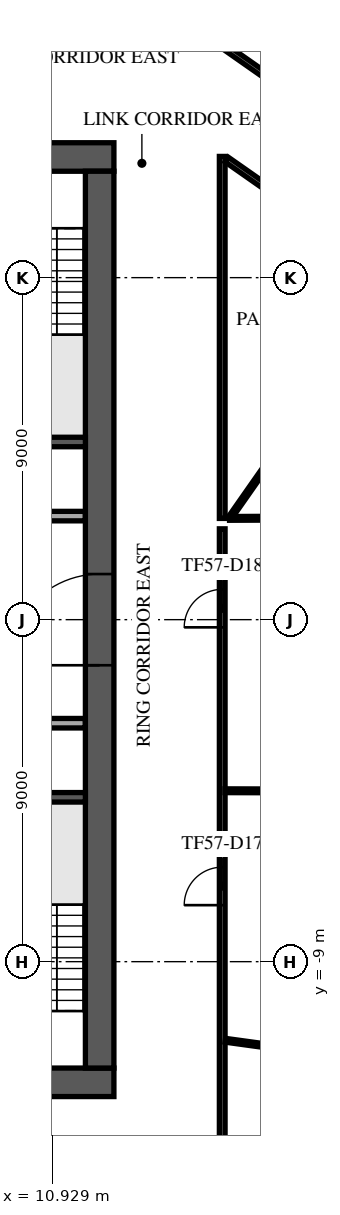
"""IFC4 building model, lengths in metres.
Left out: names, types, materials, properties, quantities, classifications, styles, units other than length and angle.
Written with IfcOpenShell. Run it as: python <this file> out.ifc"""

import sys

from ifc_helpers import new_model, si_unit, direction, frame, frame_2d, origin, place, context, subcontext, project, spatial, rectangle, extrude, element, fill, save


model = new_model("IFC4")
c1 = context("Model", 3, precision=1e-05, world=origin(), true_north=direction((0.0, 1.0)))
c2 = subcontext(c1, "Body", "Model", "MODEL_VIEW")
j1 = project(units=[si_unit("LENGTHUNIT", "METRE"), si_unit("PLANEANGLEUNIT", "RADIAN")], contexts=[c1])
p1 = place(None, origin())
s1 = spatial("IfcSite", under=j1, at=p1, CompositionType="ELEMENT")
p2 = place(p1, origin())
s2 = spatial("IfcBuilding", under=s1, at=p2, CompositionType="ELEMENT")
p3 = place(p2, frame((0.0, 0.0, 246.9)))
s3 = spatial("IfcBuildingStorey", under=s2, at=p3, CompositionType="ELEMENT", Elevation=246.9)
p4 = place(p3, frame((-12.55, 12.175, 0.0), z_axis=(0.0, 0.0, 1.0), x_axis=(1.0, 0.0, 0.0)))
e1 = element("IfcWall", 1, at=p4, inside=s3, PredefinedType="SHEAR", context=c2, shape_type="SweptSolid", body=[
    extrude(rectangle(XDim=25.1, YDim=0.75, at=frame_2d((12.55, 0.0))), origin(), (0.0, 0.0, 1.0), 3.64),
])
p5 = place(p4, frame((11.35, 0.0, 0.0)))
e2 = element("IfcOpeningElement", 2, at=p5, cuts=e1, PredefinedType="OPENING", context=c2, shape_type="SweptSolid", body=[
    extrude(rectangle(XDim=2.4, YDim=2.4, at=frame_2d((1.2, 1.2))), frame((0.0, 0.385, 0.0), z_axis=(0.0, -1.0, 0.0), x_axis=(1.0, 0.0, 0.0)), (0.0, 0.0, 1.0), 0.77),
])
p6 = place(p4, frame((22.175, 0.0, 0.0)))
e3 = element("IfcOpeningElement", 3, at=p6, cuts=e1, PredefinedType="OPENING", context=c2, shape_type="SweptSolid", body=[
    extrude(rectangle(XDim=1.2, YDim=2.1, at=frame_2d((0.6, 1.05))), frame((0.0, 0.385, 0.0), z_axis=(0.0, -1.0, 0.0), x_axis=(1.0, 0.0, 0.0)), (0.0, 0.0, 1.0), 0.77),
])
p7 = place(p4, frame((1.15, 0.0, 0.0)))
e4 = element("IfcOpeningElement", 4, at=p7, cuts=e1, PredefinedType="OPENING", context=c2, shape_type="SweptSolid", body=[
    extrude(rectangle(XDim=1.0, YDim=2.1, at=frame_2d((0.5, 1.05))), frame((0.0, 0.385, 0.0), z_axis=(0.0, -1.0, 0.0), x_axis=(1.0, 0.0, 0.0)), (0.0, 0.0, 1.0), 0.77),
])
p8 = place(p3, frame((-12.55, -12.175, 0.0), z_axis=(0.0, 0.0, 1.0), x_axis=(1.0, 0.0, 0.0)))
e5 = element("IfcWall", 5, at=p8, inside=s3, PredefinedType="SHEAR", context=c2, shape_type="SweptSolid", body=[
    extrude(rectangle(XDim=25.1, YDim=0.75, at=frame_2d((12.55, 0.0))), origin(), (0.0, 0.0, 1.0), 3.64),
])
p9 = place(p8, frame((7.45, 0.0, 0.0)))
e6 = element("IfcOpeningElement", 6, at=p9, cuts=e5, PredefinedType="OPENING", context=c2, shape_type="SweptSolid", body=[
    extrude(rectangle(XDim=2.0, YDim=2.1, at=frame_2d((1.0, 1.05))), frame((0.0, 0.385, 0.0), z_axis=(0.0, -1.0, 0.0), x_axis=(1.0, 0.0, 0.0)), (0.0, 0.0, 1.0), 0.77),
])
p10 = place(p8, frame((17.575, 0.0, 0.0)))
e7 = element("IfcOpeningElement", 7, at=p10, cuts=e5, PredefinedType="OPENING", context=c2, shape_type="SweptSolid", body=[
    extrude(rectangle(XDim=1.2, YDim=2.1, at=frame_2d((0.6, 1.05))), frame((0.0, 0.385, 0.0), z_axis=(0.0, -1.0, 0.0), x_axis=(1.0, 0.0, 0.0)), (0.0, 0.0, 1.0), 0.77),
])
p11 = place(p8, frame((1.725, 0.0, 0.0)))
e8 = element("IfcOpeningElement", 8, at=p11, cuts=e5, PredefinedType="OPENING", context=c2, shape_type="SweptSolid", body=[
    extrude(rectangle(XDim=1.2, YDim=2.1, at=frame_2d((0.6, 1.05))), frame((0.0, 0.385, 0.0), z_axis=(0.0, -1.0, 0.0), x_axis=(1.0, 0.0, 0.0)), (0.0, 0.0, 1.0), 0.77),
])
p12 = place(p8, frame((22.175, 0.0, 0.0)))
e9 = element("IfcOpeningElement", 9, at=p12, cuts=e5, PredefinedType="OPENING", context=c2, shape_type="SweptSolid", body=[
    extrude(rectangle(XDim=1.2, YDim=2.1, at=frame_2d((0.6, 1.05))), frame((0.0, 0.385, 0.0), z_axis=(0.0, -1.0, 0.0), x_axis=(1.0, 0.0, 0.0)), (0.0, 0.0, 1.0), 0.77),
])
p13 = place(p3, frame((12.175, -11.8, 0.0), z_axis=(0.0, 0.0, 1.0), x_axis=(0.0, 1.0, 0.0)))
e10 = element("IfcWall", 10, at=p13, inside=s3, PredefinedType="SHEAR", context=c2, shape_type="SweptSolid", body=[
    extrude(rectangle(XDim=23.6, YDim=0.75, at=frame_2d((11.8, 0.0))), origin(), (0.0, 0.0, 1.0), 3.64),
])
p14 = place(p13, frame((10.6, 0.0, 0.0)))
e11 = element("IfcOpeningElement", 11, at=p14, cuts=e10, PredefinedType="OPENING", context=c2, shape_type="SweptSolid", body=[
    extrude(rectangle(XDim=2.4, YDim=2.4, at=frame_2d((1.2, 1.2))), frame((0.0, 0.385, 0.0), z_axis=(0.0, -1.0, 0.0), x_axis=(1.0, 0.0, 0.0)), (0.0, 0.0, 1.0), 0.77),
])
for number, where, z_axis, x_axis in (
    (12, (8.65, 4.675, 0.0), (0.0, 0.0, 1.0), (1.0, 0.0, 0.0)),
    (13, (8.65, -4.675, 0.0), (0.0, 0.0, 1.0), (1.0, 0.0, 0.0)),
):
    element("IfcWall", number, at=place(p3, frame(where, z_axis=z_axis, x_axis=x_axis)), inside=s3, PredefinedType="SOLIDWALL", context=c2, shape_type="SweptSolid", body=[
        extrude(rectangle(XDim=3.15, YDim=0.25, at=frame_2d((1.575, 0.0))), origin(), (0.0, 0.0, 1.0), 3.64),
    ])
p15 = place(p3, frame((5.63, -2.725, 0.0), z_axis=(0.0, 0.0, 1.0), x_axis=(1.0, 0.0, 0.0)))
e14 = element("IfcWall", 14, at=p15, inside=s3, PredefinedType="PARTITIONING", context=c2, shape_type="SweptSolid", body=[
    extrude(rectangle(XDim=6.165, YDim=0.25, at=frame_2d((3.083, 0.0))), origin(), (0.0, 0.0, 1.0), 3.64),
])
p16 = place(p15, frame((0.745, 0.0, 0.0)))
e15 = element("IfcOpeningElement", 15, at=p16, cuts=e14, PredefinedType="OPENING", context=c2, shape_type="SweptSolid", body=[
    extrude(rectangle(XDim=1.0, YDim=2.1, at=frame_2d((0.5, 1.05))), frame((0.0, 0.135, 0.0), z_axis=(0.0, -1.0, 0.0), x_axis=(1.0, 0.0, 0.0)), (0.0, 0.0, 1.0), 0.27),
])
p17 = place(p15, frame((3.92, 0.0, 0.0)))
e16 = element("IfcOpeningElement", 16, at=p17, cuts=e14, PredefinedType="OPENING", context=c2, shape_type="SweptSolid", body=[
    extrude(rectangle(XDim=0.9, YDim=2.1, at=frame_2d((0.45, 1.05))), frame((0.0, 0.135, 0.0), z_axis=(0.0, -1.0, 0.0), x_axis=(1.0, 0.0, 0.0)), (0.0, 0.0, 1.0), 0.27),
])
p18 = place(p3, frame((-11.795, 2.725, 0.0), z_axis=(0.0, 0.0, 1.0), x_axis=(1.0, 0.0, 0.0)))
e17 = element("IfcWall", 17, at=p18, inside=s3, PredefinedType="PARTITIONING", context=c2, shape_type="SweptSolid", body=[
    extrude(rectangle(XDim=23.59, YDim=0.25, at=frame_2d((11.795, 0.0))), origin(), (0.0, 0.0, 1.0), 3.64),
])
p19 = place(p18, frame((21.345, 0.0, 0.0)))
e18 = element("IfcOpeningElement", 18, at=p19, cuts=e17, PredefinedType="OPENING", context=c2, shape_type="SweptSolid", body=[
    extrude(rectangle(XDim=0.9, YDim=2.1, at=frame_2d((0.45, 1.05))), frame((0.0, 0.135, 0.0), z_axis=(0.0, -1.0, 0.0), x_axis=(1.0, 0.0, 0.0)), (0.0, 0.0, 1.0), 0.27),
])
p20 = place(p18, frame((1.345, 0.0, 0.0)))
e19 = element("IfcOpeningElement", 19, at=p20, cuts=e17, PredefinedType="OPENING", context=c2, shape_type="SweptSolid", body=[
    extrude(rectangle(XDim=0.9, YDim=2.1, at=frame_2d((0.45, 1.05))), frame((0.0, 0.135, 0.0), z_axis=(0.0, -1.0, 0.0), x_axis=(1.0, 0.0, 0.0)), (0.0, 0.0, 1.0), 0.27),
])
p21 = place(p18, frame((4.42, 0.0, 0.0)))
e20 = element("IfcOpeningElement", 20, at=p21, cuts=e17, PredefinedType="OPENING", context=c2, shape_type="SweptSolid", body=[
    extrude(rectangle(XDim=1.0, YDim=2.1, at=frame_2d((0.5, 1.05))), frame((0.0, 0.135, 0.0), z_axis=(0.0, -1.0, 0.0), x_axis=(1.0, 0.0, 0.0)), (0.0, 0.0, 1.0), 0.27),
])
p22 = place(p18, frame((7.17, 0.0, 0.0)))
e21 = element("IfcOpeningElement", 21, at=p22, cuts=e17, PredefinedType="OPENING", context=c2, shape_type="SweptSolid", body=[
    extrude(rectangle(XDim=1.0, YDim=2.1, at=frame_2d((0.5, 1.05))), frame((0.0, 0.135, 0.0), z_axis=(0.0, -1.0, 0.0), x_axis=(1.0, 0.0, 0.0)), (0.0, 0.0, 1.0), 0.27),
])
p23 = place(p18, frame((12.57, 0.0, 0.0)))
e22 = element("IfcOpeningElement", 22, at=p23, cuts=e17, PredefinedType="OPENING", context=c2, shape_type="SweptSolid", body=[
    extrude(rectangle(XDim=1.2, YDim=2.1, at=frame_2d((0.6, 1.05))), frame((0.0, 0.135, 0.0), z_axis=(0.0, -1.0, 0.0), x_axis=(1.0, 0.0, 0.0)), (0.0, 0.0, 1.0), 0.27),
])
p24 = place(p3, frame((5.206, -33.362, 0.0), z_axis=(0.0, 0.0, 1.0), x_axis=(0.573577438409, 0.81915134264, 0.0)))
e23 = element("IfcWall", 23, at=p24, inside=s3, PredefinedType="STANDARD", context=c2, shape_type="SweptSolid", body=[
    extrude(rectangle(XDim=48.686, YDim=0.6, at=frame_2d((24.343, 0.0))), origin(), (0.0, 0.0, 1.0), 3.64),
])
p25 = place(p24, frame((1.213, 0.0, 0.9)))
e24 = element("IfcOpeningElement", 24, at=p25, cuts=e23, PredefinedType="OPENING", context=c2, shape_type="SweptSolid", body=[
    extrude(rectangle(XDim=2.0, YDim=2.1, at=frame_2d((1.0, 1.05))), frame((0.0, 0.31, 0.0), z_axis=(0.0, -1.0, 0.0), x_axis=(1.0, 0.0, 0.0)), (0.0, 0.0, 1.0), 0.62),
])
p26 = place(p24, frame((5.639, 0.0, 0.9)))
e25 = element("IfcOpeningElement", 25, at=p26, cuts=e23, PredefinedType="OPENING", context=c2, shape_type="SweptSolid", body=[
    extrude(rectangle(XDim=2.0, YDim=2.1, at=frame_2d((1.0, 1.05))), frame((0.0, 0.31, 0.0), z_axis=(0.0, -1.0, 0.0), x_axis=(1.0, 0.0, 0.0)), (0.0, 0.0, 1.0), 0.62),
])
p27 = place(p24, frame((10.065, 0.0, 0.9)))
e26 = element("IfcOpeningElement", 26, at=p27, cuts=e23, PredefinedType="OPENING", context=c2, shape_type="SweptSolid", body=[
    extrude(rectangle(XDim=2.0, YDim=2.1, at=frame_2d((1.0, 1.05))), frame((0.0, 0.31, 0.0), z_axis=(0.0, -1.0, 0.0), x_axis=(1.0, 0.0, 0.0)), (0.0, 0.0, 1.0), 0.62),
])
p28 = place(p24, frame((14.491, 0.0, 0.9)))
e27 = element("IfcOpeningElement", 27, at=p28, cuts=e23, PredefinedType="OPENING", context=c2, shape_type="SweptSolid", body=[
    extrude(rectangle(XDim=2.0, YDim=2.1, at=frame_2d((1.0, 1.05))), frame((0.0, 0.31, 0.0), z_axis=(0.0, -1.0, 0.0), x_axis=(1.0, 0.0, 0.0)), (0.0, 0.0, 1.0), 0.62),
])
p29 = place(p24, frame((18.917, 0.0, 0.9)))
e28 = element("IfcOpeningElement", 28, at=p29, cuts=e23, PredefinedType="OPENING", context=c2, shape_type="SweptSolid", body=[
    extrude(rectangle(XDim=2.0, YDim=2.1, at=frame_2d((1.0, 1.05))), frame((0.0, 0.31, 0.0), z_axis=(0.0, -1.0, 0.0), x_axis=(1.0, 0.0, 0.0)), (0.0, 0.0, 1.0), 0.62),
])
p30 = place(p24, frame((23.343, 0.0, 0.9)))
e29 = element("IfcOpeningElement", 29, at=p30, cuts=e23, PredefinedType="OPENING", context=c2, shape_type="SweptSolid", body=[
    extrude(rectangle(XDim=2.0, YDim=2.1, at=frame_2d((1.0, 1.05))), frame((0.0, 0.31, 0.0), z_axis=(0.0, -1.0, 0.0), x_axis=(1.0, 0.0, 0.0)), (0.0, 0.0, 1.0), 0.62),
])
p31 = place(p24, frame((27.769, 0.0, 0.9)))
e30 = element("IfcOpeningElement", 30, at=p31, cuts=e23, PredefinedType="OPENING", context=c2, shape_type="SweptSolid", body=[
    extrude(rectangle(XDim=2.0, YDim=2.1, at=frame_2d((1.0, 1.05))), frame((0.0, 0.31, 0.0), z_axis=(0.0, -1.0, 0.0), x_axis=(1.0, 0.0, 0.0)), (0.0, 0.0, 1.0), 0.62),
])
p32 = place(p24, frame((32.195, 0.0, 0.9)))
e31 = element("IfcOpeningElement", 31, at=p32, cuts=e23, PredefinedType="OPENING", context=c2, shape_type="SweptSolid", body=[
    extrude(rectangle(XDim=2.0, YDim=2.1, at=frame_2d((1.0, 1.05))), frame((0.0, 0.31, 0.0), z_axis=(0.0, -1.0, 0.0), x_axis=(1.0, 0.0, 0.0)), (0.0, 0.0, 1.0), 0.62),
])
p33 = place(p24, frame((36.621, 0.0, 0.9)))
e32 = element("IfcOpeningElement", 32, at=p33, cuts=e23, PredefinedType="OPENING", context=c2, shape_type="SweptSolid", body=[
    extrude(rectangle(XDim=2.0, YDim=2.1, at=frame_2d((1.0, 1.05))), frame((0.0, 0.31, 0.0), z_axis=(0.0, -1.0, 0.0), x_axis=(1.0, 0.0, 0.0)), (0.0, 0.0, 1.0), 0.62),
])
p34 = place(p24, frame((41.047, 0.0, 0.9)))
e33 = element("IfcOpeningElement", 33, at=p34, cuts=e23, PredefinedType="OPENING", context=c2, shape_type="SweptSolid", body=[
    extrude(rectangle(XDim=2.0, YDim=2.1, at=frame_2d((1.0, 1.05))), frame((0.0, 0.31, 0.0), z_axis=(0.0, -1.0, 0.0), x_axis=(1.0, 0.0, 0.0)), (0.0, 0.0, 1.0), 0.62),
])
p35 = place(p24, frame((45.473, 0.0, 0.9)))
e34 = element("IfcOpeningElement", 34, at=p35, cuts=e23, PredefinedType="OPENING", context=c2, shape_type="SweptSolid", body=[
    extrude(rectangle(XDim=2.0, YDim=2.1, at=frame_2d((1.0, 1.05))), frame((0.0, 0.31, 0.0), z_axis=(0.0, -1.0, 0.0), x_axis=(1.0, 0.0, 0.0)), (0.0, 0.0, 1.0), 0.62),
])
p36 = place(p3, frame((31.815, 13.98, 0.0), z_axis=(0.0, 0.0, 1.0), x_axis=(-0.819152162902, 0.573576266955, 0.0)))
e35 = element("IfcWall", 35, at=p36, inside=s3, PredefinedType="STANDARD", context=c2, shape_type="SweptSolid", body=[
    extrude(rectangle(XDim=36.243, YDim=0.6, at=frame_2d((18.122, 0.0))), origin(), (0.0, 0.0, 1.0), 3.64),
])
p37 = place(p36, frame((1.215, 0.0, 0.9)))
e36 = element("IfcOpeningElement", 36, at=p37, cuts=e35, PredefinedType="OPENING", context=c2, shape_type="SweptSolid", body=[
    extrude(rectangle(XDim=2.1, YDim=2.1, at=frame_2d((1.05, 1.05))), frame((0.0, 0.31, 0.0), z_axis=(0.0, -1.0, 0.0), x_axis=(1.0, 0.0, 0.0)), (0.0, 0.0, 1.0), 0.62),
])
p38 = place(p36, frame((5.746, 0.0, 0.9)))
e37 = element("IfcOpeningElement", 37, at=p38, cuts=e35, PredefinedType="OPENING", context=c2, shape_type="SweptSolid", body=[
    extrude(rectangle(XDim=2.1, YDim=2.1, at=frame_2d((1.05, 1.05))), frame((0.0, 0.31, 0.0), z_axis=(0.0, -1.0, 0.0), x_axis=(1.0, 0.0, 0.0)), (0.0, 0.0, 1.0), 0.62),
])
p39 = place(p36, frame((10.276, 0.0, 0.9)))
e38 = element("IfcOpeningElement", 38, at=p39, cuts=e35, PredefinedType="OPENING", context=c2, shape_type="SweptSolid", body=[
    extrude(rectangle(XDim=2.1, YDim=2.1, at=frame_2d((1.05, 1.05))), frame((0.0, 0.31, 0.0), z_axis=(0.0, -1.0, 0.0), x_axis=(1.0, 0.0, 0.0)), (0.0, 0.0, 1.0), 0.62),
])
p40 = place(p36, frame((14.806, 0.0, 0.9)))
e39 = element("IfcOpeningElement", 39, at=p40, cuts=e35, PredefinedType="OPENING", context=c2, shape_type="SweptSolid", body=[
    extrude(rectangle(XDim=2.1, YDim=2.1, at=frame_2d((1.05, 1.05))), frame((0.0, 0.31, 0.0), z_axis=(0.0, -1.0, 0.0), x_axis=(1.0, 0.0, 0.0)), (0.0, 0.0, 1.0), 0.62),
])
p41 = place(p36, frame((19.337, 0.0, 0.9)))
e40 = element("IfcOpeningElement", 40, at=p41, cuts=e35, PredefinedType="OPENING", context=c2, shape_type="SweptSolid", body=[
    extrude(rectangle(XDim=2.1, YDim=2.1, at=frame_2d((1.05, 1.05))), frame((0.0, 0.31, 0.0), z_axis=(0.0, -1.0, 0.0), x_axis=(1.0, 0.0, 0.0)), (0.0, 0.0, 1.0), 0.62),
])
p42 = place(p36, frame((23.867, 0.0, 0.9)))
e41 = element("IfcOpeningElement", 41, at=p42, cuts=e35, PredefinedType="OPENING", context=c2, shape_type="SweptSolid", body=[
    extrude(rectangle(XDim=2.1, YDim=2.1, at=frame_2d((1.05, 1.05))), frame((0.0, 0.31, 0.0), z_axis=(0.0, -1.0, 0.0), x_axis=(1.0, 0.0, 0.0)), (0.0, 0.0, 1.0), 0.62),
])
p43 = place(p36, frame((28.398, 0.0, 0.9)))
e42 = element("IfcOpeningElement", 42, at=p43, cuts=e35, PredefinedType="OPENING", context=c2, shape_type="SweptSolid", body=[
    extrude(rectangle(XDim=2.1, YDim=2.1, at=frame_2d((1.05, 1.05))), frame((0.0, 0.31, 0.0), z_axis=(0.0, -1.0, 0.0), x_axis=(1.0, 0.0, 0.0)), (0.0, 0.0, 1.0), 0.62),
])
p44 = place(p36, frame((32.928, 0.0, 0.9)))
e43 = element("IfcOpeningElement", 43, at=p44, cuts=e35, PredefinedType="OPENING", context=c2, shape_type="SweptSolid", body=[
    extrude(rectangle(XDim=2.1, YDim=2.1, at=frame_2d((1.05, 1.05))), frame((0.0, 0.31, 0.0), z_axis=(0.0, -1.0, 0.0), x_axis=(1.0, 0.0, 0.0)), (0.0, 0.0, 1.0), 0.62),
])
p45 = place(p3, frame((-1.89, 27.226, 0.0), z_axis=(0.0, 0.0, 1.0), x_axis=(0.819163235761, -0.573560452941, 0.0)))
e44 = element("IfcWall", 44, at=p45, inside=s3, PredefinedType="PARTITIONING", context=c2, shape_type="SweptSolid", body=[
    extrude(rectangle(XDim=34.403, YDim=0.15, at=frame_2d((17.202, 0.0))), origin(), (0.0, 0.0, 1.0), 3.24),
])
p46 = place(p45, frame((7.427, 0.0, 0.0)))
e45 = element("IfcOpeningElement", 45, at=p46, cuts=e44, PredefinedType="OPENING", context=c2, shape_type="SweptSolid", body=[
    extrude(rectangle(XDim=1.0, YDim=2.1, at=frame_2d((0.5, 1.05))), frame((0.0, 0.085, 0.0), z_axis=(0.0, -1.0, 0.0), x_axis=(1.0, 0.0, 0.0)), (0.0, 0.0, 1.0), 0.17),
])
p47 = place(p45, frame((15.173, 0.0, 0.0)))
e46 = element("IfcOpeningElement", 46, at=p47, cuts=e44, PredefinedType="OPENING", context=c2, shape_type="SweptSolid", body=[
    extrude(rectangle(XDim=1.0, YDim=2.1, at=frame_2d((0.5, 1.05))), frame((0.0, 0.085, 0.0), z_axis=(0.0, -1.0, 0.0), x_axis=(1.0, 0.0, 0.0)), (0.0, 0.0, 1.0), 0.17),
])
p48 = place(p45, frame((19.273, 0.0, 0.0)))
e47 = element("IfcOpeningElement", 47, at=p48, cuts=e44, PredefinedType="OPENING", context=c2, shape_type="SweptSolid", body=[
    extrude(rectangle(XDim=1.0, YDim=2.1, at=frame_2d((0.5, 1.05))), frame((0.0, 0.085, 0.0), z_axis=(0.0, -1.0, 0.0), x_axis=(1.0, 0.0, 0.0)), (0.0, 0.0, 1.0), 0.17),
])
p49 = place(p3, frame((15.4, -15.325, 0.0), z_axis=(0.0, 0.0, 1.0), x_axis=(0.0, 1.0, 0.0)))
e48 = element("IfcWall", 48, at=p49, inside=s3, PredefinedType="PARTITIONING", context=c2, shape_type="SweptSolid", body=[
    extrude(rectangle(XDim=17.715, YDim=0.15, at=frame_2d((8.857, 0.0))), origin(), (0.0, 0.0, 1.0), 3.24),
])
p50 = place(p49, frame((7.812, 0.0, 0.0)))
e49 = element("IfcOpeningElement", 49, at=p50, cuts=e48, PredefinedType="OPENING", context=c2, shape_type="SweptSolid", body=[
    extrude(rectangle(XDim=1.0, YDim=2.1, at=frame_2d((0.5, 1.05))), frame((0.0, 0.085, 0.0), z_axis=(0.0, -1.0, 0.0), x_axis=(1.0, 0.0, 0.0)), (0.0, 0.0, 1.0), 0.17),
])
p51 = place(p49, frame((15.123, 0.0, 0.0)))
e50 = element("IfcOpeningElement", 50, at=p51, cuts=e48, PredefinedType="OPENING", context=c2, shape_type="SweptSolid", body=[
    extrude(rectangle(XDim=1.0, YDim=2.1, at=frame_2d((0.5, 1.05))), frame((0.0, 0.085, 0.0), z_axis=(0.0, -1.0, 0.0), x_axis=(1.0, 0.0, 0.0)), (0.0, 0.0, 1.0), 0.17),
])
p52 = place(p3, frame((15.4, 2.664, 0.0), z_axis=(0.0, 0.0, 1.0), x_axis=(0.0, 1.0, 0.0)))
e51 = element("IfcWall", 51, at=p52, inside=s3, PredefinedType="PARTITIONING", context=c2, shape_type="SweptSolid", body=[
    extrude(rectangle(XDim=9.526, YDim=0.15, at=frame_2d((4.763, 0.0))), origin(), (0.0, 0.0, 1.0), 3.24),
])
p53 = place(p3, frame((15.518, 12.107, 0.0), z_axis=(0.0, 0.0, 1.0), x_axis=(0.819171924474, -0.573548043457, 0.0)))
e52 = element("IfcWall", 52, at=p53, inside=s3, PredefinedType="PARTITIONING", context=c2, shape_type="SweptSolid", body=[
    extrude(rectangle(XDim=11.471, YDim=0.15, at=frame_2d((5.736, 0.0))), origin(), (0.0, 0.0, 1.0), 3.24),
])
p54 = place(p53, frame((2.05, 0.0, 0.0)))
e53 = element("IfcOpeningElement", 53, at=p54, cuts=e52, PredefinedType="OPENING", context=c2, shape_type="SweptSolid", body=[
    extrude(rectangle(XDim=1.0, YDim=2.1, at=frame_2d((0.5, 1.05))), frame((0.0, 0.085, 0.0), z_axis=(0.0, -1.0, 0.0), x_axis=(1.0, 0.0, 0.0)), (0.0, 0.0, 1.0), 0.17),
])
p55 = place(p53, frame((10.027, 0.0, 0.0)))
e54 = element("IfcOpeningElement", 54, at=p55, cuts=e52, PredefinedType="OPENING", context=c2, shape_type="SweptSolid", body=[
    extrude(rectangle(XDim=1.0, YDim=2.1, at=frame_2d((0.5, 1.05))), frame((0.0, 0.085, 0.0), z_axis=(0.0, -1.0, 0.0), x_axis=(1.0, 0.0, 0.0)), (0.0, 0.0, 1.0), 0.17),
])
p56 = place(p3, frame((15.482, -11.068, 0.0), z_axis=(0.0, 0.0, 1.0), x_axis=(0.990680100766, -0.136209169832, 0.0)))
e55 = element("IfcWall", 55, at=p56, inside=s3, PredefinedType="PARTITIONING", context=c2, shape_type="SweptSolid", body=[
    extrude(rectangle(XDim=4.573, YDim=0.1, at=frame_2d((2.286, 0.0))), origin(), (0.0, 0.0, 1.0), 3.12),
])
p57 = place(p3, frame((15.475, -4.502, 0.0), z_axis=(0.0, 0.0, 1.0), x_axis=(0.999996329774, -0.00270932448, 0.0)))
e56 = element("IfcWall", 56, at=p57, inside=s3, PredefinedType="PARTITIONING", context=c2, shape_type="SweptSolid", body=[
    extrude(rectangle(XDim=9.552, YDim=0.1, at=frame_2d((4.776, 0.0))), origin(), (0.0, 0.0, 1.0), 3.24),
])
p58 = place(p3, frame((15.593, 2.665, 0.0), z_axis=(0.0, 0.0, 1.0), x_axis=(0.999993270933, 0.003668526741, 0.0)))
e57 = element("IfcWall", 57, at=p58, inside=s3, PredefinedType="PARTITIONING", context=c2, shape_type="SweptSolid", body=[
    extrude(rectangle(XDim=14.508, YDim=0.1, at=frame_2d((7.254, 0.0))), origin(), (0.0, 0.0, 1.0), 3.64),
])
p59 = place(p3, frame((15.648, 2.744, 0.0), z_axis=(0.0, 0.0, 1.0), x_axis=(0.57357562998, 0.819152608915, 0.0)))
e58 = element("IfcWall", 58, at=p59, inside=s3, PredefinedType="PARTITIONING", context=c2, shape_type="SweptSolid", body=[
    extrude(rectangle(XDim=7.521, YDim=0.1, at=frame_2d((3.76, 0.0))), origin(), (0.0, 0.0, 1.0), 3.24),
])
p60 = place(p14, origin())
e59 = element("IfcDoor", 59, at=p60, inside=s3, OperationType="SINGLE_SWING_LEFT", PredefinedType="DOOR", context=c2, shape_type="SweptSolid", body=[
    extrude(rectangle(XDim=2.4, YDim=2.4, at=frame_2d((1.2, 1.2))), frame((0.0, 0.025, 0.0), z_axis=(0.0, -1.0, 0.0), x_axis=(1.0, 0.0, 0.0)), (0.0, 0.0, 1.0), 0.05),
])
fill(e11, e59)
p61 = place(p50, frame((1.0, 0.0, 0.0), z_axis=(0.0, 0.0, 1.0), x_axis=(-1.0, 0.0, 0.0)))
e60 = element("IfcDoor", 60, at=p61, inside=s3, OperationType="SINGLE_SWING_RIGHT", PredefinedType="DOOR", context=c2, shape_type="SweptSolid", body=[
    extrude(rectangle(XDim=1.0, YDim=2.1, at=frame_2d((0.5, 1.05))), frame((0.0, 0.025, 0.0), z_axis=(0.0, -1.0, 0.0), x_axis=(1.0, 0.0, 0.0)), (0.0, 0.0, 1.0), 0.05),
])
fill(e49, e60)
p62 = place(p51, frame((1.0, 0.0, 0.0), z_axis=(0.0, 0.0, 1.0), x_axis=(-1.0, 0.0, 0.0)))
e61 = element("IfcDoor", 61, at=p62, inside=s3, OperationType="SINGLE_SWING_RIGHT", PredefinedType="DOOR", context=c2, shape_type="SweptSolid", body=[
    extrude(rectangle(XDim=1.0, YDim=2.1, at=frame_2d((0.5, 1.05))), frame((0.0, 0.025, 0.0), z_axis=(0.0, -1.0, 0.0), x_axis=(1.0, 0.0, 0.0)), (0.0, 0.0, 1.0), 0.05),
])
fill(e50, e61)
save(model, sys.argv[1])
